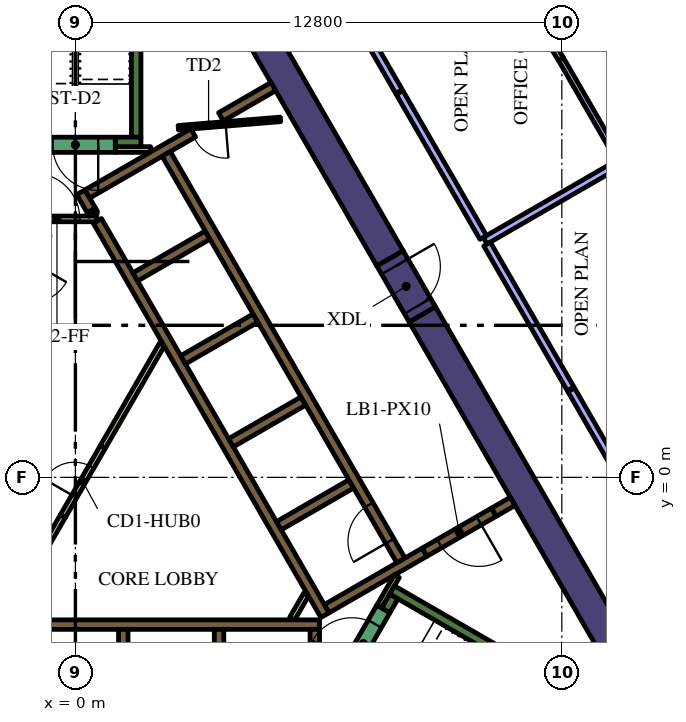
"""IFC4 building model, lengths in metres.
Left out: names, types, materials, properties, quantities, classifications, styles, units other than length and angle.
Written with IfcOpenShell. Run it as: python <this file> out.ifc"""

import sys

from ifc_helpers import new_model, si_unit, direction, frame, frame_2d, origin, place, context, subcontext, project, spatial, rectangle, extrude, element, fill, save


model = new_model("IFC4")
c1 = context("Model", 3, precision=1e-05, world=origin(), true_north=direction((0.0, 1.0)))
c2 = subcontext(c1, "Body", "Model", "MODEL_VIEW")
j1 = project(units=[si_unit("LENGTHUNIT", "METRE"), si_unit("PLANEANGLEUNIT", "RADIAN")], contexts=[c1])
p1 = place(None, origin())
s1 = spatial("IfcSite", under=j1, at=p1, CompositionType="ELEMENT")
p2 = place(p1, origin())
s2 = spatial("IfcBuilding", under=s1, at=p2, CompositionType="ELEMENT")
p3 = place(p2, frame((0.0, 0.0, 158.4)))
s3 = spatial("IfcBuildingStorey", under=s2, at=p3, CompositionType="ELEMENT", Elevation=158.4)
p4 = place(p3, frame((9.129, 4.289, 0.0), z_axis=(0.0, 0.0, 1.0), x_axis=(0.499995742806, -0.866027861663, 0.0)))
e1 = element("IfcWall", 1, at=p4, inside=s3, PredefinedType="SOLIDWALL", context=c2, shape_type="SweptSolid", body=[
    extrude(rectangle(XDim=12.527, YDim=0.8, at=frame_2d((6.264, 0.0))), origin(), (0.0, 0.0, 1.0), 4.2),
])
p5 = place(p3, frame((8.279, 5.761, 0.0), z_axis=(0.0, 0.0, 1.0), x_axis=(-0.500010359015, 0.866019422922, 0.0)))
e2 = element("IfcWall", 2, at=p5, inside=s3, PredefinedType="SOLIDWALL", context=c2, shape_type="SweptSolid", body=[
    extrude(rectangle(XDim=12.528, YDim=0.8, at=frame_2d((6.264, 0.0))), origin(), (0.0, 0.0, 1.0), 4.2),
])
p6 = place(p3, frame((8.334, -2.964, 0.0), z_axis=(0.0, 0.0, 1.0), x_axis=(0.866016039709, -0.500016218704, 0.0)))
e3 = element("IfcWall", 3, at=p6, inside=s3, PredefinedType="SOLIDWALL", context=c2, shape_type="SweptSolid", body=[
    extrude(rectangle(XDim=7.05, YDim=0.25, at=frame_2d((3.525, 0.0))), origin(), (0.0, 0.0, 1.0), 4.2),
])
p7 = place(p3, frame((8.168, -3.503, 0.0), z_axis=(0.0, 0.0, 1.0), x_axis=(0.49972245349, 0.866185586049, 0.0)))
e4 = element("IfcWall", 4, at=p7, inside=s3, PredefinedType="SOLIDWALL", context=c2, shape_type="SweptSolid", body=[
    extrude(rectangle(XDim=0.425, YDim=0.25, at=frame_2d((0.212, 0.0))), origin(), (0.0, 0.0, 1.0), 4.2),
])
p8 = place(p3, frame((1.6, 8.95, 0.0), z_axis=(0.0, 0.0, 1.0), x_axis=(0.0, 1.0, 0.0)))
e5 = element("IfcWall", 5, at=p8, inside=s3, PredefinedType="SOLIDWALL", context=c2, shape_type="SweptSolid", body=[
    extrude(rectangle(XDim=6.8, YDim=0.25, at=frame_2d((3.4, 0.0))), origin(), (0.0, 0.0, 1.0), 4.2),
])
p9 = place(p3, frame((1.05, 8.825, 0.0), z_axis=(0.0, 0.0, 1.0), x_axis=(1.0, 0.0, 0.0)))
e6 = element("IfcWall", 6, at=p9, inside=s3, PredefinedType="SOLIDWALL", context=c2, shape_type="SweptSolid", body=[
    extrude(rectangle(XDim=0.675, YDim=0.25, at=frame_2d((0.337, 0.0))), origin(), (0.0, 0.0, 1.0), 4.2),
])
p10 = place(p3, frame((-5.545, -3.875, 0.0), z_axis=(0.0, 0.0, 1.0), x_axis=(1.0, 0.0, 0.0)))
e7 = element("IfcWall", 7, at=p10, inside=s3, PredefinedType="SOLIDWALL", context=c2, shape_type="SweptSolid", body=[
    extrude(rectangle(XDim=11.97, YDim=0.25, at=frame_2d((5.985, 0.0))), origin(), (0.0, 0.0, 1.0), 4.2),
])
p11 = place(p3, frame((6.3, -7.24, 0.0), z_axis=(0.0, 0.0, 1.0), x_axis=(0.0, 1.0, 0.0)))
e8 = element("IfcWall", 8, at=p11, inside=s3, PredefinedType="SOLIDWALL", context=c2, shape_type="SweptSolid", body=[
    extrude(rectangle(XDim=3.24, YDim=0.25, at=frame_2d((1.62, 0.0))), origin(), (0.0, 0.0, 1.0), 4.2),
])
for number, where, z_axis, x_axis in (
    (9, (3.78, -4.0, 0.0), (0.0, 0.0, 1.0), (0.0, -1.0, 0.0)),
    (10, (1.26, -4.0, 0.0), (0.0, 0.0, 1.0), (0.0, -1.0, 0.0)),
):
    element("IfcWall", number, at=place(p3, frame(where, z_axis=z_axis, x_axis=x_axis)), inside=s3, PredefinedType="SOLIDWALL", context=c2, shape_type="SweptSolid", body=[
        extrude(rectangle(XDim=2.2, YDim=0.25, at=frame_2d((1.1, 0.0))), origin(), (0.0, 0.0, 1.0), 4.2),
    ])
p12 = place(p3, frame((11.507, -0.631, 0.0), z_axis=(0.0, 0.0, 1.0), x_axis=(-0.866093731455, -0.499881634324, 0.0)))
e11 = element("IfcWall", 11, at=p12, inside=s3, PredefinedType="SOLIDWALL", context=c2, shape_type="SweptSolid", body=[
    extrude(rectangle(XDim=0.575, YDim=0.25, at=frame_2d((0.288, 0.0))), origin(), (0.0, 0.0, 1.0), 4.2),
])
p13 = place(p3, frame((0.473, 6.93, 0.0), z_axis=(0.0, 0.0, 1.0), x_axis=(-0.49972245349, 0.866185586049, 0.0)))
e12 = element("IfcWall", 12, at=p13, inside=s3, PredefinedType="SOLIDWALL", context=c2, shape_type="SweptSolid", body=[
    extrude(rectangle(XDim=0.11, YDim=0.25, at=frame_2d((0.055, 0.0))), origin(), (0.0, 0.0, 1.0), 4.2),
])
p14 = place(p3, frame((6.568, -3.627, 0.0), z_axis=(0.0, 0.0, 1.0), x_axis=(-0.499999455981, 0.866025717874, 0.0)))
e13 = element("IfcWall", 13, at=p14, inside=s3, PredefinedType="SOLIDWALL", context=c2, shape_type="SweptSolid", body=[
    extrude(rectangle(XDim=11.978, YDim=0.25, at=frame_2d((5.989, 0.0))), origin(), (0.0, 0.0, 1.0), 4.2),
])
p15 = place(p3, frame((0.417, 7.027, 0.0), z_axis=(0.0, 0.0, 1.0), x_axis=(-0.500210807569, 0.865903659763, 0.0)))
e14 = element("IfcWall", 14, at=p15, inside=s3, PredefinedType="SOLIDWALL", context=c2, shape_type="SweptSolid", body=[
    extrude(rectangle(XDim=0.548, YDim=0.25, at=frame_2d((0.274, 0.0))), origin(), (0.0, 0.0, 1.0), 4.2),
])
p16 = place(p3, frame((3.1, 9.064, 0.0), z_axis=(0.0, 0.0, 1.0), x_axis=(-0.866030133475, -0.499991807846, 0.0)))
e15 = element("IfcWall", 15, at=p16, inside=s3, PredefinedType="SOLIDWALL", context=c2, shape_type="SweptSolid", body=[
    extrude(rectangle(XDim=3.217, YDim=0.25, at=frame_2d((1.608, 0.0))), origin(), (0.0, 0.0, 1.0), 4.2),
])
p17 = place(p3, frame((1.574, 5.274, 0.0), z_axis=(0.0, 0.0, 1.0), x_axis=(0.866028486751, 0.499994660107, 0.0)))
e16 = element("IfcWall", 16, at=p17, inside=s3, PredefinedType="SOLIDWALL", context=c2, shape_type="SweptSolid", body=[
    extrude(rectangle(XDim=2.2, YDim=0.25, at=frame_2d((1.1, 0.0))), origin(), (0.0, 0.0, 1.0), 4.2),
])
for number, where, z_axis, x_axis in (
    (17, (2.834, 3.091, 0.0), (0.0, 0.0, 1.0), (0.866, 0.5, 0.0)),
    (18, (4.094, 0.909, 0.0), (0.0, 0.0, 1.0), (0.866, 0.5, 0.0)),
    (19, (5.354, -1.274, 0.0), (0.0, 0.0, 1.0), (0.866, 0.5, 0.0)),
):
    element("IfcWall", number, at=place(p3, frame(where, z_axis=z_axis, x_axis=x_axis)), inside=s3, PredefinedType="SOLIDWALL", context=c2, shape_type="SweptSolid", body=[
        extrude(rectangle(XDim=2.2, YDim=0.25, at=frame_2d((1.1, 0.0))), origin(), (0.0, 0.0, 1.0), 4.2),
    ])
p18 = place(p3, frame((6.614, -3.456, 0.0), z_axis=(0.0, 0.0, 1.0), x_axis=(0.866032512851, 0.499987686533, 0.0)))
e20 = element("IfcWall", 20, at=p18, inside=s3, PredefinedType="SOLIDWALL", context=c2, shape_type="SweptSolid", body=[
    extrude(rectangle(XDim=2.975, YDim=0.25, at=frame_2d((1.487, 0.0))), origin(), (0.0, 0.0, 1.0), 4.2),
])
p19 = place(p3, frame((3.83, 9.486, 0.0), z_axis=(0.0, 0.0, 1.0), x_axis=(0.865986202621, 0.500067892261, 0.0)))
e21 = element("IfcWall", 21, at=p19, inside=s3, PredefinedType="SOLIDWALL", context=c2, shape_type="SweptSolid", body=[
    extrude(rectangle(XDim=1.591, YDim=0.25, at=frame_2d((0.795, 0.0))), origin(), (0.0, 0.0, 1.0), 4.2),
])
p20 = place(p3, frame((1.05, 8.625, 0.0), z_axis=(0.0, 0.0, 1.0), x_axis=(1.0, 0.0, 0.0)))
e22 = element("IfcWall", 22, at=p20, inside=s3, PredefinedType="PARTITIONING", context=c2, shape_type="SweptSolid", body=[
    extrude(rectangle(XDim=0.929, YDim=0.15, at=frame_2d((0.464, 0.0))), origin(), (0.0, 0.0, 1.0), 3.15),
])
p21 = place(p3, frame((8.459, -2.599, 0.0), z_axis=(0.0, 0.0, 1.0), x_axis=(-0.500041054325, -0.866001699761, 0.0)))
e23 = element("IfcWall", 23, at=p21, inside=s3, PredefinedType="PARTITIONING", context=c2, shape_type="SweptSolid", body=[
    extrude(rectangle(XDim=0.929, YDim=0.15, at=frame_2d((0.464, 0.0))), origin(), (0.0, 0.0, 1.0), 4.2),
])
p22 = place(p3, frame((5.705, -3.718, 0.0), z_axis=(0.0, 0.0, 1.0), x_axis=(0.499962090823, 0.866047289552, 0.0)))
e24 = element("IfcWall", 24, at=p22, inside=s3, PredefinedType="PARTITIONING", context=c2, shape_type="SweptSolid", body=[
    extrude(rectangle(XDim=0.735, YDim=0.15, at=frame_2d((0.367, 0.0))), origin(), (0.0, 0.0, 1.0), 3.15),
])
p23 = place(p3, frame((-1.887, -3.718, 0.0), z_axis=(0.0, 0.0, 1.0), x_axis=(0.500043732237, 0.866000153493, 0.0)))
e25 = element("IfcWall", 25, at=p23, inside=s3, PredefinedType="PARTITIONING", context=c2, shape_type="SweptSolid", body=[
    extrude(rectangle(XDim=3.114, YDim=0.15, at=frame_2d((1.557, 0.0))), origin(), (0.0, 0.0, 1.0), 3.15),
])
p24 = place(p3, frame((0.72, 0.797, 0.0), z_axis=(0.0, 0.0, 1.0), x_axis=(0.499984921984, 0.866034108906, 0.0)))
e26 = element("IfcWall", 26, at=p24, inside=s3, PredefinedType="PARTITIONING", context=c2, shape_type="SweptSolid", body=[
    extrude(rectangle(XDim=3.113, YDim=0.15, at=frame_2d((1.557, 0.0))), origin(), (0.0, 0.0, 1.0), 3.15),
])
p25 = place(p3, frame((8.565, -2.185, 0.0), z_axis=(0.0, 0.0, 1.0), x_axis=(-0.499997954832, 0.866026584559, 0.0)))
e27 = element("IfcWall", 27, at=p25, inside=s3, PredefinedType="SOLIDWALL", context=c2, shape_type="SweptSolid", body=[
    extrude(rectangle(XDim=12.35, YDim=0.25, at=frame_2d((6.175, 0.0))), origin(), (0.0, 0.0, 1.0), 4.2),
])
p26 = place(p25, frame((0.585, 0.0, 0.0)))
e28 = element("IfcOpeningElement", 28, at=p26, cuts=e27, PredefinedType="OPENING", context=c2, shape_type="SweptSolid", body=[
    extrude(rectangle(XDim=1.1, YDim=2.1, at=frame_2d((0.55, 1.05))), frame((0.0, 0.135, 0.0), z_axis=(0.0, -1.0, 0.0), x_axis=(1.0, 0.0, 0.0)), (0.0, 0.0, 1.0), 0.27),
])
p27 = place(p3, frame((7.053, -5.284, 0.0), z_axis=(0.0, 0.0, 1.0), x_axis=(0.500078061341, 0.865980330357, 0.0)))
e29 = element("IfcWall", 29, at=p27, inside=s3, PredefinedType="SOLIDWALL", context=c2, shape_type="SweptSolid", body=[
    extrude(rectangle(XDim=2.1, YDim=0.4, at=frame_2d((1.05, 0.0))), origin(), (0.0, 0.0, 1.0), 4.2),
])
p28 = place(p27, frame((0.45, 0.0, 0.0)))
e30 = element("IfcOpeningElement", 30, at=p28, cuts=e29, PredefinedType="OPENING", context=c2, shape_type="SweptSolid", body=[
    extrude(rectangle(XDim=1.2, YDim=2.1, at=frame_2d((0.6, 1.05))), frame((0.0, 0.21, 0.0), z_axis=(0.0, -1.0, 0.0), x_axis=(1.0, 0.0, 0.0)), (0.0, 0.0, 1.0), 0.42),
])
p29 = place(p3, frame((1.05, 8.75, 0.0), z_axis=(0.0, 0.0, 1.0), x_axis=(-1.0, 0.0, 0.0)))
e31 = element("IfcWall", 31, at=p29, inside=s3, PredefinedType="SOLIDWALL", context=c2, shape_type="SweptSolid", body=[
    extrude(rectangle(XDim=2.1, YDim=0.4, at=frame_2d((1.05, 0.0))), origin(), (0.0, 0.0, 1.0), 4.2),
])
p30 = place(p29, frame((0.45, 0.0, 0.0)))
e32 = element("IfcOpeningElement", 32, at=p30, cuts=e31, PredefinedType="OPENING", context=c2, shape_type="SweptSolid", body=[
    extrude(rectangle(XDim=1.2, YDim=2.1, at=frame_2d((0.6, 1.05))), frame((0.0, 0.21, 0.0), z_axis=(0.0, -1.0, 0.0), x_axis=(1.0, 0.0, 0.0)), (0.0, 0.0, 1.0), 0.42),
])
p31 = place(p3, frame((5.398, 9.419, 0.0), z_axis=(0.0, 0.0, 1.0), x_axis=(-0.996653416376, -0.081743303248, 0.0)))
e33 = element("IfcWall", 33, at=p31, inside=s3, PredefinedType="PARTITIONING", context=c2, shape_type="SweptSolid", body=[
    extrude(rectangle(XDim=2.7, YDim=0.12, at=frame_2d((1.35, 0.0))), origin(), (0.0, 0.0, 1.0), 3.15),
])
p32 = place(p31, frame((1.45, 0.0, 0.0)))
e34 = element("IfcOpeningElement", 34, at=p32, cuts=e33, PredefinedType="OPENING", context=c2, shape_type="SweptSolid", body=[
    extrude(rectangle(XDim=0.9, YDim=2.1, at=frame_2d((0.45, 1.05))), frame((0.0, 0.07, 0.0), z_axis=(0.0, -1.0, 0.0), x_axis=(1.0, 0.0, 0.0)), (0.0, 0.0, 1.0), 0.14),
])
p33 = place(p3, frame((-0.33, -1.022, 0.0), z_axis=(0.0, 0.0, 1.0), x_axis=(0.500027713859, 0.866009402589, 0.0)))
e35 = element("IfcWall", 35, at=p33, inside=s3, PredefinedType="PARTITIONING", context=c2, shape_type="SweptSolid", body=[
    extrude(rectangle(XDim=2.1, YDim=0.15, at=frame_2d((1.05, 0.0))), origin(), (0.0, 0.0, 1.0), 3.15),
])
p34 = place(p33, frame((0.6, 0.0, 0.0)))
e36 = element("IfcOpeningElement", 36, at=p34, cuts=e35, PredefinedType="OPENING", context=c2, shape_type="SweptSolid", body=[
    extrude(rectangle(XDim=0.9, YDim=2.1, at=frame_2d((0.45, 1.05))), frame((0.0, 0.085, 0.0), z_axis=(0.0, -1.0, 0.0), x_axis=(1.0, 0.0, 0.0)), (0.0, 0.0, 1.0), 0.17),
])
p35 = place(p3, frame((-1.534, 6.8, 0.0), z_axis=(0.0, 0.0, 1.0), x_axis=(1.0, 0.0, 0.0)))
e37 = element("IfcWall", 37, at=p35, inside=s3, PredefinedType="PARTITIONING", context=c2, shape_type="SweptSolid", body=[
    extrude(rectangle(XDim=2.1, YDim=0.15, at=frame_2d((1.05, 0.0))), origin(), (0.0, 0.0, 1.0), 3.15),
])
p36 = place(p35, frame((0.45, 0.0, 0.0)))
e38 = element("IfcOpeningElement", 38, at=p36, cuts=e37, PredefinedType="OPENING", context=c2, shape_type="SweptSolid", body=[
    extrude(rectangle(XDim=1.2, YDim=2.1, at=frame_2d((0.6, 1.05))), frame((0.0, 0.085, 0.0), z_axis=(0.0, -1.0, 0.0), x_axis=(1.0, 0.0, 0.0)), (0.0, 0.0, 1.0), 0.17),
])
p37 = place(p3, frame((11.009, -0.919, 0.0), z_axis=(0.0, 0.0, 1.0), x_axis=(-0.866059744384, -0.49994051562, 0.0)))
e39 = element("IfcWall", 39, at=p37, inside=s3, PredefinedType="SOLIDWALL", context=c2, shape_type="SweptSolid", body=[
    extrude(rectangle(XDim=2.1, YDim=0.25, at=frame_2d((1.05, 0.0))), origin(), (0.0, 0.0, 1.0), 4.2),
])
p38 = place(p37, frame((0.45, 0.0, 0.0)))
e40 = element("IfcOpeningElement", 40, at=p38, cuts=e39, PredefinedType="OPENING", context=c2, shape_type="SweptSolid", body=[
    extrude(rectangle(XDim=1.2, YDim=2.1, at=frame_2d((0.6, 1.05))), frame((0.0, 0.135, 0.0), z_axis=(0.0, -1.0, 0.0), x_axis=(1.0, 0.0, 0.0)), (0.0, 0.0, 1.0), 0.27),
])
p39 = place(p3, frame((8.279, 5.761, 0.0), z_axis=(0.0, 0.0, 1.0), x_axis=(0.500062241894, -0.865989465428, 0.0)))
e41 = element("IfcWall", 41, at=p39, inside=s3, PredefinedType="SOLIDWALL", context=c2, shape_type="SweptSolid", body=[
    extrude(rectangle(XDim=1.7, YDim=0.8, at=frame_2d((0.85, 0.0))), origin(), (0.0, 0.0, 1.0), 4.2),
])
p40 = place(p39, frame((0.25, 0.0, 0.0)))
e42 = element("IfcOpeningElement", 42, at=p40, cuts=e41, PredefinedType="OPENING", context=c2, shape_type="SweptSolid", body=[
    extrude(rectangle(XDim=1.2, YDim=2.1, at=frame_2d((0.6, 1.05))), frame((0.0, 0.41, 0.0), z_axis=(0.0, -1.0, 0.0), x_axis=(1.0, 0.0, 0.0)), (0.0, 0.0, 1.0), 0.82),
])
p41 = place(p3, frame((10.782, 6.225, 0.0), z_axis=(0.0, 0.0, 1.0), x_axis=(0.866034752867, 0.499983806564, 0.0)))
e43 = element("IfcWall", 43, at=p41, inside=s3, PredefinedType="PARTITIONING", context=c2, shape_type="SweptSolid", body=[
    extrude(rectangle(XDim=4.043, YDim=0.2, at=frame_2d((2.021, 0.0))), origin(), (0.0, 0.0, 1.0), 3.15),
])
p42 = place(p3, frame((13.032, 2.328, 0.0), z_axis=(0.0, 0.0, 1.0), x_axis=(-0.499988222896, 0.866032203192, 0.0)))
e44 = element("IfcWall", 44, at=p42, inside=s3, PredefinedType="PARTITIONING", context=c2, shape_type="SweptSolid", body=[
    extrude(rectangle(XDim=4.4, YDim=0.2, at=frame_2d((2.2, 0.0))), origin(), (0.0, 0.0, 1.0), 3.15),
])
p43 = place(p3, frame((18.042, -6.35, 0.0), z_axis=(0.0, 0.0, 1.0), x_axis=(-0.499986873641, 0.866032982159, 0.0)))
e45 = element("IfcWall", 45, at=p43, inside=s3, PredefinedType="PARTITIONING", context=c2, shape_type="SweptSolid", body=[
    extrude(rectangle(XDim=9.99, YDim=0.2, at=frame_2d((4.995, 0.0))), origin(), (0.0, 0.0, 1.0), 3.15),
])
p44 = place(p43, frame((4.5, 0.0, 0.0)))
e46 = element("IfcOpeningElement", 46, at=p44, cuts=e45, PredefinedType="OPENING", context=c2, shape_type="SweptSolid", body=[
    extrude(rectangle(XDim=1.0, YDim=2.1, at=frame_2d((0.5, 1.05))), frame((0.0, 0.11, 0.0), z_axis=(0.0, -1.0, 0.0), x_axis=(1.0, 0.0, 0.0)), (0.0, 0.0, 1.0), 0.22),
])
p45 = place(p3, frame((14.299, 8.371, 0.0), z_axis=(0.0, 0.0, 1.0), x_axis=(-0.500019211527, 0.86601431172, 0.0)))
e47 = element("IfcWall", 47, at=p45, inside=s3, PredefinedType="PARTITIONING", context=c2, shape_type="SweptSolid", body=[
    extrude(rectangle(XDim=3.039, YDim=0.15, at=frame_2d((1.519, 0.0))), origin(), (0.0, 0.0, 1.0), 3.15),
])
p46 = place(p3, frame((9.403, 16.447, 0.0), z_axis=(0.0, 0.0, 1.0), x_axis=(0.527026092571, -0.849849102929, 0.0)))
e48 = element("IfcWall", 48, at=p46, inside=s3, PredefinedType="PARTITIONING", context=c2, shape_type="SweptSolid", body=[
    extrude(rectangle(XDim=6.407, YDim=0.15, at=frame_2d((3.204, 0.0))), origin(), (0.0, 0.0, 1.0), 3.15),
])
p47 = place(p46, frame((2.707, 0.0, 0.0)))
e49 = element("IfcOpeningElement", 49, at=p47, cuts=e48, PredefinedType="OPENING", context=c2, shape_type="SweptSolid", body=[
    extrude(rectangle(XDim=0.9, YDim=2.1, at=frame_2d((0.45, 1.05))), frame((0.0, 0.085, 0.0), z_axis=(0.0, -1.0, 0.0), x_axis=(1.0, 0.0, 0.0)), (0.0, 0.0, 1.0), 0.17),
])
p48 = place(p3, frame((10.732, 6.312, 0.0), z_axis=(0.0, 0.0, 1.0), x_axis=(-0.499984786451, 0.866034187153, 0.0)))
e50 = element("IfcWall", 50, at=p48, inside=s3, PredefinedType="PARTITIONING", context=c2, shape_type="SweptSolid", body=[
    extrude(rectangle(XDim=4.404, YDim=0.2, at=frame_2d((2.202, 0.0))), origin(), (0.0, 0.0, 1.0), 3.15),
])
p49 = place(p3, frame((8.515, 10.152, 0.0), z_axis=(0.0, 0.0, 1.0), x_axis=(-0.499998974385, 0.866025995923, 0.0)))
e51 = element("IfcWall", 51, at=p49, inside=s3, PredefinedType="PARTITIONING", context=c2, shape_type="SweptSolid", body=[
    extrude(rectangle(XDim=9.986, YDim=0.2, at=frame_2d((4.993, 0.0))), origin(), (0.0, 0.0, 1.0), 3.15),
])
p50 = place(p49, frame((4.5, 0.0, 0.0)))
e52 = element("IfcOpeningElement", 52, at=p50, cuts=e51, PredefinedType="OPENING", context=c2, shape_type="SweptSolid", body=[
    extrude(rectangle(XDim=1.0, YDim=2.1, at=frame_2d((0.5, 1.05))), frame((0.0, 0.11, 0.0), z_axis=(0.0, -1.0, 0.0), x_axis=(1.0, 0.0, 0.0)), (0.0, 0.0, 1.0), 0.22),
])
p51 = place(p26, origin())
e53 = element("IfcDoor", 53, at=p51, inside=s3, OperationType="DOUBLE_DOOR_SLIDING", PredefinedType="DOOR", context=c2, shape_type="SweptSolid", body=[
    extrude(rectangle(XDim=1.1, YDim=2.1, at=frame_2d((0.55, 1.05))), frame((0.0, 0.025, 0.0), z_axis=(0.0, -1.0, 0.0), x_axis=(1.0, 0.0, 0.0)), (0.0, 0.0, 1.0), 0.05),
])
fill(e28, e53)
p52 = place(p28, origin())
e54 = element("IfcDoor", 54, at=p52, inside=s3, OperationType="SINGLE_SWING_LEFT", PredefinedType="DOOR", context=c2, shape_type="SweptSolid", body=[
    extrude(rectangle(XDim=1.2, YDim=2.1, at=frame_2d((0.6, 1.05))), frame((0.0, 0.025, 0.0), z_axis=(0.0, -1.0, 0.0), x_axis=(1.0, 0.0, 0.0)), (0.0, 0.0, 1.0), 0.05),
])
fill(e30, e54)
p53 = place(p30, origin())
e55 = element("IfcDoor", 55, at=p53, inside=s3, OperationType="SINGLE_SWING_LEFT", PredefinedType="DOOR", context=c2, shape_type="SweptSolid", body=[
    extrude(rectangle(XDim=1.2, YDim=2.1, at=frame_2d((0.6, 1.05))), frame((0.0, 0.025, 0.0), z_axis=(0.0, -1.0, 0.0), x_axis=(1.0, 0.0, 0.0)), (0.0, 0.0, 1.0), 0.05),
])
fill(e32, e55)
p54 = place(p32, origin())
e56 = element("IfcDoor", 56, at=p54, inside=s3, OperationType="SINGLE_SWING_LEFT", PredefinedType="DOOR", context=c2, shape_type="SweptSolid", body=[
    extrude(rectangle(XDim=0.9, YDim=2.1, at=frame_2d((0.45, 1.05))), frame((0.0, 0.025, 0.0), z_axis=(0.0, -1.0, 0.0), x_axis=(1.0, 0.0, 0.0)), (0.0, 0.0, 1.0), 0.05),
])
fill(e34, e56)
p55 = place(p34, origin())
e57 = element("IfcDoor", 57, at=p55, inside=s3, OperationType="SINGLE_SWING_LEFT", PredefinedType="DOOR", context=c2, shape_type="SweptSolid", body=[
    extrude(rectangle(XDim=0.9, YDim=2.1, at=frame_2d((0.45, 1.05))), frame((0.0, 0.025, 0.0), z_axis=(0.0, -1.0, 0.0), x_axis=(1.0, 0.0, 0.0)), (0.0, 0.0, 1.0), 0.05),
])
fill(e36, e57)
p56 = place(p36, origin())
e58 = element("IfcDoor", 58, at=p56, inside=s3, OperationType="SINGLE_SWING_LEFT", PredefinedType="DOOR", context=c2, shape_type="SweptSolid", body=[
    extrude(rectangle(XDim=1.2, YDim=2.1, at=frame_2d((0.6, 1.05))), frame((0.0, 0.025, 0.0), z_axis=(0.0, -1.0, 0.0), x_axis=(1.0, 0.0, 0.0)), (0.0, 0.0, 1.0), 0.05),
])
fill(e38, e58)
p57 = place(p38, origin())
e59 = element("IfcDoor", 59, at=p57, inside=s3, OperationType="SINGLE_SWING_LEFT", PredefinedType="DOOR", context=c2, shape_type="SweptSolid", body=[
    extrude(rectangle(XDim=1.2, YDim=2.1, at=frame_2d((0.6, 1.05))), frame((0.0, 0.025, 0.0), z_axis=(0.0, -1.0, 0.0), x_axis=(1.0, 0.0, 0.0)), (0.0, 0.0, 1.0), 0.05),
])
fill(e40, e59)
p58 = place(p40, origin())
e60 = element("IfcDoor", 60, at=p58, inside=s3, OperationType="SINGLE_SWING_LEFT", PredefinedType="DOOR", context=c2, shape_type="SweptSolid", body=[
    extrude(rectangle(XDim=1.2, YDim=2.1, at=frame_2d((0.6, 1.05))), frame((0.0, 0.025, 0.0), z_axis=(0.0, -1.0, 0.0), x_axis=(1.0, 0.0, 0.0)), (0.0, 0.0, 1.0), 0.05),
])
fill(e42, e60)
save(model, sys.argv[1])
